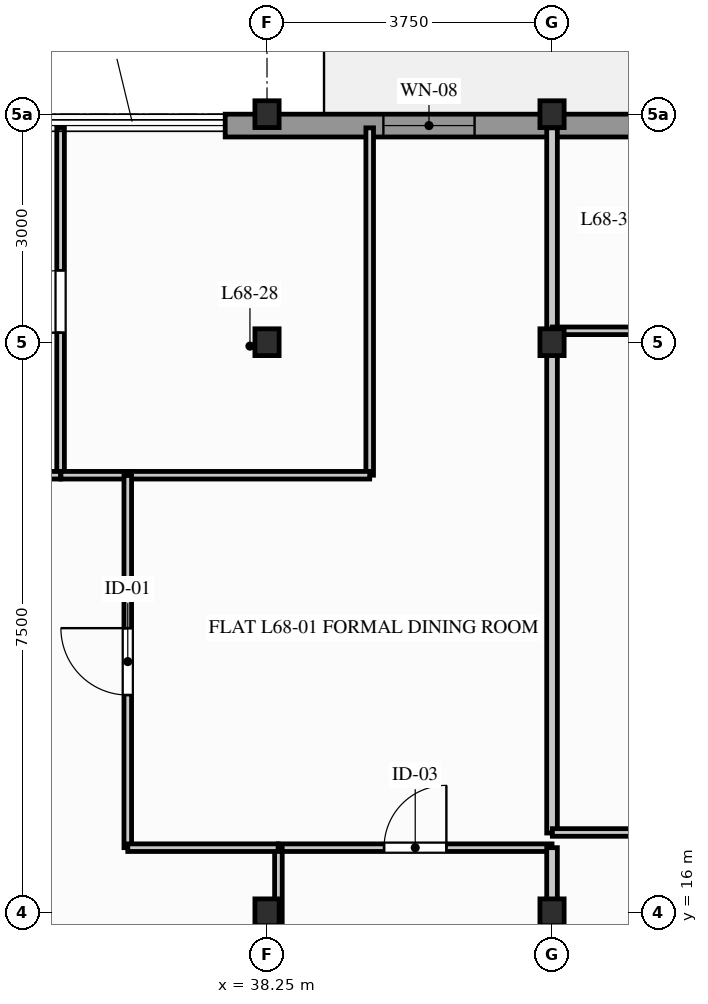
"""IFC4 building model, lengths in metres.
Left out: names, types, materials, properties, quantities, classifications, styles, units other than length and angle.
Written with IfcOpenShell. Run it as: python <this file> out.ifc"""

import sys

from ifc_helpers import new_model, si_unit, direction, frame, frame_2d, origin, origin_2d, place, context, subcontext, project, spatial, rectangle, i_section, extrude, element, fill, save


model = new_model("IFC4")
c1 = context("Model", 3, precision=1e-05, world=origin(), true_north=direction((0.0, 1.0)))
c2 = subcontext(c1, "Body", "Model", "MODEL_VIEW")
j1 = project(units=[si_unit("LENGTHUNIT", "METRE"), si_unit("PLANEANGLEUNIT", "RADIAN")], contexts=[c1])
p1 = place(None, origin())
s1 = spatial("IfcSite", under=j1, at=p1, CompositionType="ELEMENT")
p2 = place(p1, origin())
s2 = spatial("IfcBuilding", under=s1, at=p2, CompositionType="ELEMENT")
p3 = place(p2, frame((0.0, 0.0, 224.2)))
s3 = spatial("IfcBuildingStorey", under=s2, at=p3, CompositionType="ELEMENT", Elevation=224.2)
for number, where, z_axis, x_axis in (
    (1, (38.25, 16.0, 0.0), (0.0, 0.0, 1.0), (1.0, 0.0, 0.0)),
    (2, (38.25, 23.5, 0.0), (0.0, 0.0, 1.0), (1.0, 0.0, 0.0)),
    (3, (38.25, 26.5, 0.0), (0.0, 0.0, 1.0), (1.0, 0.0, 0.0)),
    (4, (42.0, 16.0, 0.0), (0.0, 0.0, 1.0), (1.0, 0.0, 0.0)),
    (5, (42.0, 23.5, 0.0), (0.0, 0.0, 1.0), (1.0, 0.0, 0.0)),
    (6, (42.0, 26.5, 0.0), (0.0, 0.0, 1.0), (1.0, 0.0, 0.0)),
):
    element("IfcColumn", number, at=place(p3, frame(where, z_axis=z_axis, x_axis=x_axis)), inside=s3, PredefinedType="COLUMN", context=c2, shape_type="SweptSolid", body=[
        extrude(i_section(OverallWidth=0.318, OverallDepth=0.353, WebThickness=0.023, FlangeThickness=0.038, FilletRadius=0.015, at=origin_2d()), origin(), (0.0, 0.0, 1.0), 3.1),
    ])
p4 = place(p3, frame((37.7, 26.35, 0.0), z_axis=(0.0, 0.0, 1.0), x_axis=(1.0, 0.0, 0.0)))
e7 = element("IfcWall", 7, at=p4, inside=s3, PredefinedType="STANDARD", context=c2, shape_type="SweptSolid", body=[
    extrude(rectangle(XDim=10.85, YDim=0.3, at=frame_2d((5.425, 0.0))), origin(), (0.0, 0.0, 1.0), 2.332),
])
p5 = place(p4, frame((5.475, 0.0, 0.0)))
e8 = element("IfcOpeningElement", 8, at=p5, cuts=e7, PredefinedType="OPENING", context=c2, shape_type="SweptSolid", body=[
    extrude(rectangle(XDim=1.25, YDim=2.2, at=frame_2d((0.625, 1.1))), frame((0.0, 0.16, 0.0), z_axis=(0.0, -1.0, 0.0), x_axis=(1.0, 0.0, 0.0)), (0.0, 0.0, 1.0), 0.32),
])
p6 = place(p4, frame((2.081, 0.0, 0.512)))
e9 = element("IfcOpeningElement", 9, at=p6, cuts=e7, PredefinedType="OPENING", context=c2, shape_type="SweptSolid", body=[
    extrude(rectangle(XDim=1.2, YDim=1.6, at=frame_2d((0.6, 0.8))), frame((0.0, 0.16, 0.0), z_axis=(0.0, -1.0, 0.0), x_axis=(1.0, 0.0, 0.0)), (0.0, 0.0, 1.0), 0.32),
])
p7 = place(p3, frame((38.4, 16.85, 0.0), z_axis=(0.0, 0.0, 1.0), x_axis=(1.0, 0.0, 0.0)))
e10 = element("IfcWall", 10, at=p7, inside=s3, PredefinedType="PARTITIONING", context=c2, shape_type="SweptSolid", body=[
    extrude(rectangle(XDim=3.6, YDim=0.1, at=frame_2d((1.8, 0.0))), origin(), (0.0, 0.0, 1.0), 2.325),
])
p8 = place(p7, frame((1.39, 0.0, 0.0)))
e11 = element("IfcOpeningElement", 11, at=p8, cuts=e10, PredefinedType="OPENING", context=c2, shape_type="SweptSolid", body=[
    extrude(rectangle(XDim=0.82, YDim=2.02, at=frame_2d((0.41, 1.01))), frame((0.0, 0.06, 0.0), z_axis=(0.0, -1.0, 0.0), x_axis=(1.0, 0.0, 0.0)), (0.0, 0.0, 1.0), 0.12),
])
p9 = place(p3, frame((38.4, 14.504, 0.0), z_axis=(0.0, 0.0, 1.0), x_axis=(0.0, 1.0, 0.0)))
e12 = element("IfcWall", 12, at=p9, inside=s3, PredefinedType="PARTITIONING", context=c2, shape_type="SweptSolid", body=[
    extrude(rectangle(XDim=2.346, YDim=0.1, at=frame_2d((1.173, 0.0))), origin(), (0.0, 0.0, 1.0), 2.325),
])
p10 = place(p3, frame((42.0, 14.504, 0.0), z_axis=(0.0, 0.0, 1.0), x_axis=(0.0, 1.0, 0.0)))
e13 = element("IfcWall", 13, at=p10, inside=s3, PredefinedType="PARTITIONING", context=c2, shape_type="SweptSolid", body=[
    extrude(rectangle(XDim=2.346, YDim=0.14, at=frame_2d((1.173, 0.0))), origin(), (0.0, 0.0, 1.0), 2.325),
])
p11 = place(p3, frame((35.534, 21.75, 0.0), z_axis=(0.0, 0.0, 1.0), x_axis=(0.0, 1.0, 0.0)))
e14 = element("IfcWall", 14, at=p11, inside=s3, PredefinedType="PARTITIONING", context=c2, shape_type="SweptSolid", body=[
    extrude(rectangle(XDim=4.57, YDim=0.1, at=frame_2d((2.285, 0.0))), origin(), (0.0, 0.0, 1.0), 2.325),
])
p12 = place(p11, frame((1.875, 0.0, 0.0)))
e15 = element("IfcOpeningElement", 15, at=p12, cuts=e14, PredefinedType="OPENING", context=c2, shape_type="SweptSolid", body=[
    extrude(rectangle(XDim=0.82, YDim=2.02, at=frame_2d((0.41, 1.01))), frame((0.0, 0.06, 0.0), z_axis=(0.0, -1.0, 0.0), x_axis=(1.0, 0.0, 0.0)), (0.0, 0.0, 1.0), 0.12),
])
p13 = place(p3, frame((31.471, 21.75, 0.0), z_axis=(0.0, 0.0, 1.0), x_axis=(1.0, 0.0, 0.0)))
e16 = element("IfcWall", 16, at=p13, inside=s3, PredefinedType="PARTITIONING", context=c2, shape_type="SweptSolid", body=[
    extrude(rectangle(XDim=4.063, YDim=0.1, at=frame_2d((2.031, 0.0))), origin(), (0.0, 0.0, 1.0), 2.89),
])
p14 = place(p13, frame((1.592, 0.0, 0.0)))
e17 = element("IfcOpeningElement", 17, at=p14, cuts=e16, PredefinedType="OPENING", context=c2, shape_type="SweptSolid", body=[
    extrude(rectangle(XDim=0.88, YDim=2.04, at=frame_2d((0.44, 1.02))), frame((0.0, 0.06, 0.0), z_axis=(0.0, -1.0, 0.0), x_axis=(1.0, 0.0, 0.0)), (0.0, 0.0, 1.0), 0.12),
])
p15 = place(p3, frame((39.601, 21.75, 0.0), z_axis=(0.0, 0.0, 1.0), x_axis=(0.0, 1.0, 0.0)))
e18 = element("IfcWall", 18, at=p15, inside=s3, PredefinedType="PARTITIONING", context=c2, shape_type="SweptSolid", body=[
    extrude(rectangle(XDim=4.57, YDim=0.1, at=frame_2d((2.285, 0.0))), origin(), (0.0, 0.0, 1.0), 2.325),
])
p16 = place(p3, frame((36.407, 21.75, 0.0), z_axis=(0.0, 0.0, 1.0), x_axis=(1.0, 0.0, 0.0)))
e19 = element("IfcWall", 19, at=p16, inside=s3, PredefinedType="PARTITIONING", context=c2, shape_type="SweptSolid", body=[
    extrude(rectangle(XDim=3.194, YDim=0.1, at=frame_2d((1.597, 0.0))), origin(), (0.0, 0.0, 1.0), 2.325),
])
p17 = place(p3, frame((35.538, 21.75, 0.0), z_axis=(0.0, 0.0, 1.0), x_axis=(1.0, 0.0, 0.0)))
e20 = element("IfcWall", 20, at=p17, inside=s3, PredefinedType="PARTITIONING", context=c2, shape_type="SweptSolid", body=[
    extrude(rectangle(XDim=0.887, YDim=0.1, at=frame_2d((0.444, 0.0))), origin(), (0.0, 0.0, 1.0), 2.89),
])
p18 = place(p3, frame((36.418, 16.85, 0.0), z_axis=(0.0, 0.0, 1.0), x_axis=(0.0, 1.0, 0.0)))
e21 = element("IfcWall", 21, at=p18, inside=s3, PredefinedType="PARTITIONING", context=c2, shape_type="SweptSolid", body=[
    extrude(rectangle(XDim=4.896, YDim=0.1, at=frame_2d((2.448, 0.0))), origin(), (0.0, 0.0, 1.0), 2.614),
])
p19 = place(p18, frame((2.008, 0.0, 0.0)))
e22 = element("IfcOpeningElement", 22, at=p19, cuts=e21, PredefinedType="OPENING", context=c2, shape_type="SweptSolid", body=[
    extrude(rectangle(XDim=0.88, YDim=2.04, at=frame_2d((0.44, 1.02))), frame((0.0, 0.06, 0.0), z_axis=(0.0, -1.0, 0.0), x_axis=(1.0, 0.0, 0.0)), (0.0, 0.0, 1.0), 0.12),
])
p20 = place(p3, frame((36.418, 16.85, 0.0), z_axis=(0.0, 0.0, 1.0), x_axis=(1.0, 0.0, 0.0)))
e23 = element("IfcWall", 23, at=p20, inside=s3, PredefinedType="PARTITIONING", context=c2, shape_type="SweptSolid", body=[
    extrude(rectangle(XDim=1.978, YDim=0.1, at=frame_2d((0.989, 0.0))), origin(), (0.0, 0.0, 1.0), 2.325),
])
p21 = place(p3, frame((42.0, 23.639, 0.0), z_axis=(0.0, 0.0, 1.0), x_axis=(0.0, 1.0, 0.0)))
e24 = element("IfcWall", 24, at=p21, inside=s3, PredefinedType="PARTITIONING", context=c2, shape_type="SweptSolid", body=[
    extrude(rectangle(XDim=2.681, YDim=0.14, at=frame_2d((1.341, 0.0))), origin(), (0.0, 0.0, 1.0), 2.325),
])
p22 = place(p3, frame((42.0, 17.043, 0.0), z_axis=(0.0, 0.0, 1.0), x_axis=(0.0, 1.0, 0.0)))
e25 = element("IfcWall", 25, at=p22, inside=s3, PredefinedType="PARTITIONING", context=c2, shape_type="SweptSolid", body=[
    extrude(rectangle(XDim=6.615, YDim=0.14, at=frame_2d((3.307, 0.0))), origin(), (0.0, 0.0, 1.0), 2.325),
])
p23 = place(p3, frame((42.004, 17.05, 0.0), z_axis=(0.0, 0.0, 1.0), x_axis=(1.0, 0.0, 0.0)))
e26 = element("IfcWall", 26, at=p23, inside=s3, PredefinedType="PARTITIONING", context=c2, shape_type="SweptSolid", body=[
    extrude(rectangle(XDim=3.096, YDim=0.1, at=frame_2d((1.548, 0.0))), origin(), (0.0, 0.0, 1.0), 2.325),
])
p24 = place(p23, frame((1.138, 0.0, 0.0)))
e27 = element("IfcOpeningElement", 27, at=p24, cuts=e26, PredefinedType="OPENING", context=c2, shape_type="SweptSolid", body=[
    extrude(rectangle(XDim=0.82, YDim=2.02, at=frame_2d((0.41, 1.01))), frame((0.0, 0.06, 0.0), z_axis=(0.0, -1.0, 0.0), x_axis=(1.0, 0.0, 0.0)), (0.0, 0.0, 1.0), 0.12),
])
p25 = place(p3, frame((42.004, 23.65, 0.0), z_axis=(0.0, 0.0, 1.0), x_axis=(1.0, 0.0, 0.0)))
e28 = element("IfcWall", 28, at=p25, inside=s3, PredefinedType="PARTITIONING", context=c2, shape_type="SweptSolid", body=[
    extrude(rectangle(XDim=3.096, YDim=0.1, at=frame_2d((1.548, 0.0))), origin(), (0.0, 0.0, 1.0), 2.325),
])
p26 = place(p25, frame((1.108, 0.0, 0.0)))
e29 = element("IfcOpeningElement", 29, at=p26, cuts=e28, PredefinedType="OPENING", context=c2, shape_type="SweptSolid", body=[
    extrude(rectangle(XDim=0.88, YDim=2.04, at=frame_2d((0.44, 1.02))), frame((0.0, 0.06, 0.0), z_axis=(0.0, -1.0, 0.0), x_axis=(1.0, 0.0, 0.0)), (0.0, 0.0, 1.0), 0.12),
])
p27 = place(p6, origin())
e30 = element("IfcWindow", 30, at=p27, inside=s3, PartitioningType="SINGLE_PANEL", PredefinedType="WINDOW", context=c2, shape_type="SweptSolid", body=[
    extrude(rectangle(XDim=1.2, YDim=1.6, at=frame_2d((0.6, 0.8))), frame((0.0, 0.03, 0.0), z_axis=(0.0, -1.0, 0.0), x_axis=(1.0, 0.0, 0.0)), (0.0, 0.0, 1.0), 0.06),
])
fill(e9, e30)
p28 = place(p19, origin())
e31 = element("IfcDoor", 31, at=p28, inside=s3, OperationType="SINGLE_SWING_RIGHT", PredefinedType="DOOR", context=c2, shape_type="SweptSolid", body=[
    extrude(rectangle(XDim=0.88, YDim=2.04, at=frame_2d((0.44, 1.02))), frame((0.0, 0.025, 0.0), z_axis=(0.0, -1.0, 0.0), x_axis=(1.0, 0.0, 0.0)), (0.0, 0.0, 1.0), 0.05),
])
fill(e22, e31)
p29 = place(p8, origin())
e32 = element("IfcDoor", 32, at=p29, inside=s3, OperationType="SINGLE_SWING_RIGHT", PredefinedType="DOOR", context=c2, shape_type="SweptSolid", body=[
    extrude(rectangle(XDim=0.82, YDim=2.02, at=frame_2d((0.41, 1.01))), frame((0.0, 0.025, 0.0), z_axis=(0.0, -1.0, 0.0), x_axis=(1.0, 0.0, 0.0)), (0.0, 0.0, 1.0), 0.05),
])
fill(e11, e32)
p30 = place(p12, origin())
e33 = element("IfcDoor", 33, at=p30, inside=s3, OperationType="SINGLE_SWING_LEFT", PredefinedType="DOOR", context=c2, shape_type="SweptSolid", body=[
    extrude(rectangle(XDim=0.82, YDim=2.02, at=frame_2d((0.41, 1.01))), frame((0.0, 0.025, 0.0), z_axis=(0.0, -1.0, 0.0), x_axis=(1.0, 0.0, 0.0)), (0.0, 0.0, 1.0), 0.05),
])
fill(e15, e33)
save(model, sys.argv[1])
